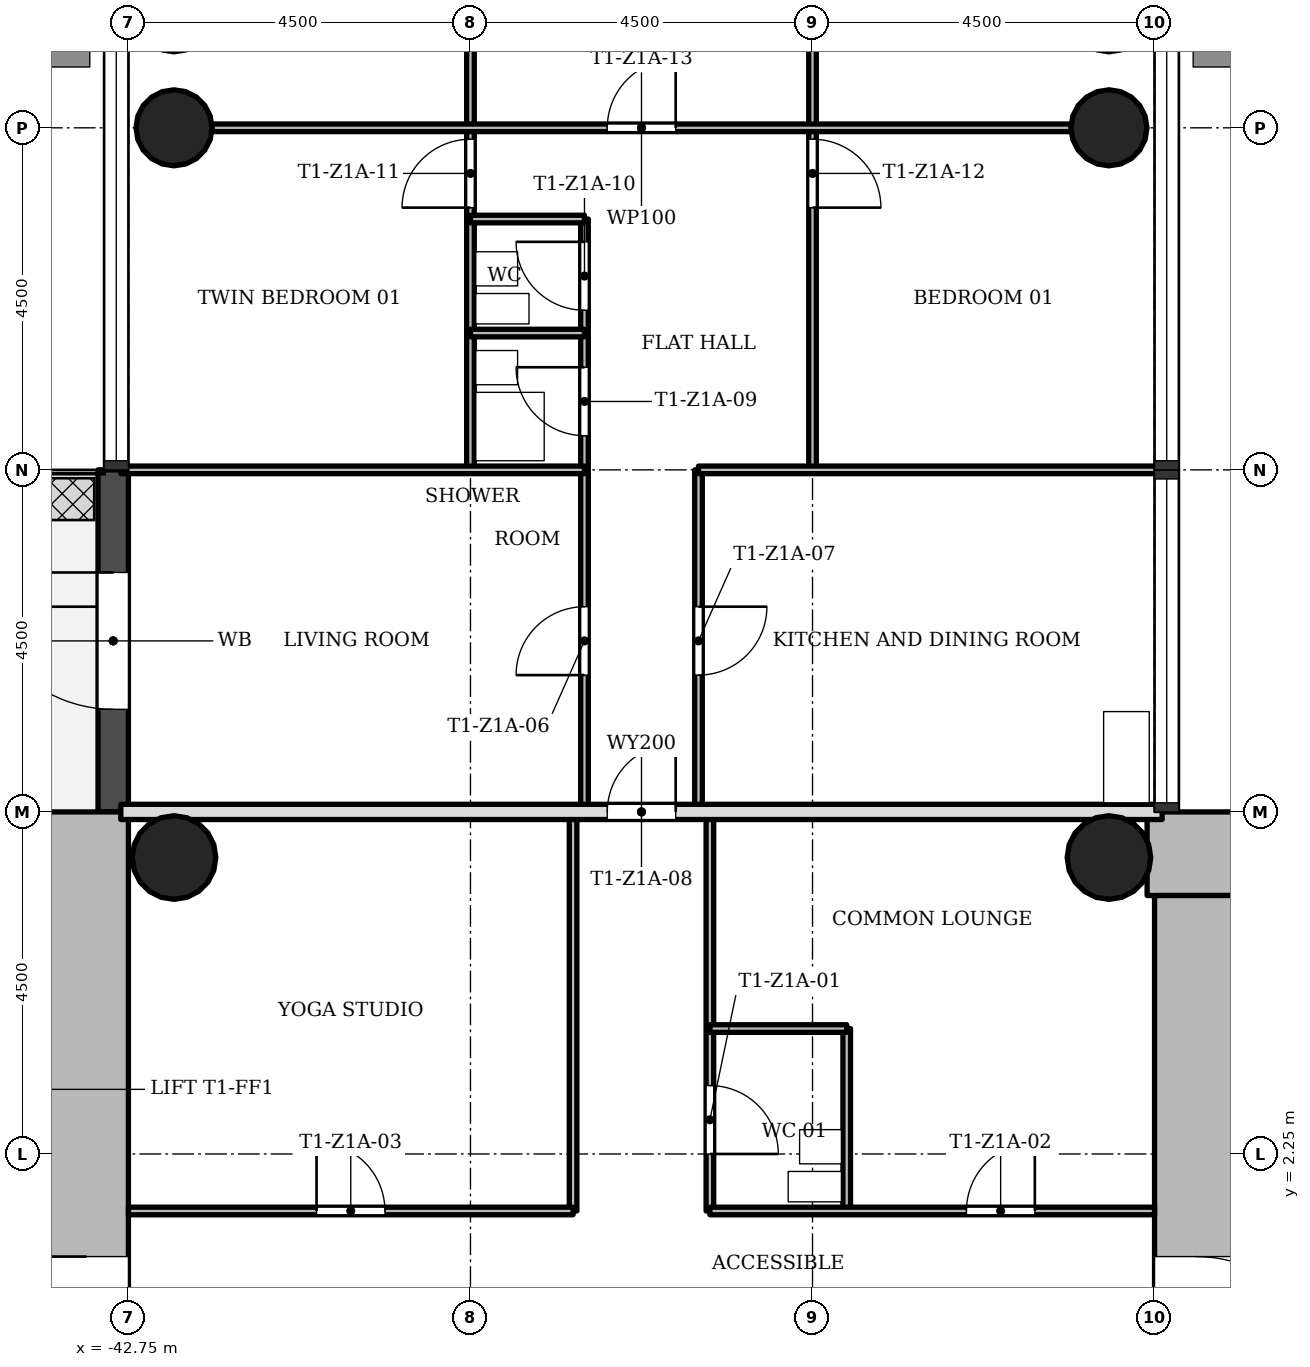
"""IFC4 building model, lengths in metres.
Left out: names, types, materials, properties, quantities, classifications, styles, units other than length and angle.
Written with IfcOpenShell. Run it as: python <this file> out.ifc"""

import sys

from ifc_helpers import new_model, si_unit, direction, frame, frame_2d, origin, origin_2d, place, context, subcontext, project, spatial, rectangle, hollow_circle, extrude, element, fill, save


model = new_model("IFC4")
c1 = context("Model", 3, precision=1e-05, world=origin(), true_north=direction((0.0, 1.0)))
c2 = subcontext(c1, "Body", "Model", "MODEL_VIEW")
j1 = project(units=[si_unit("LENGTHUNIT", "METRE"), si_unit("PLANEANGLEUNIT", "RADIAN")], contexts=[c1])
p1 = place(None, origin())
s1 = spatial("IfcSite", under=j1, at=p1, CompositionType="ELEMENT")
p2 = place(p1, origin())
s2 = spatial("IfcBuilding", under=s1, at=p2, CompositionType="ELEMENT")
p3 = place(p2, frame((0.0, 0.0, 31.3)))
s3 = spatial("IfcBuildingStorey", under=s2, at=p3, CompositionType="ELEMENT", Elevation=31.3)
p4 = place(p3, frame((-21.35, 6.2, 0.0), z_axis=(0.0, 0.0, 1.0), x_axis=(-1.0, 0.0, 0.0)))
e1 = element("IfcWall", 1, at=p4, inside=s3, PredefinedType="SHEAR", context=c2, shape_type="SweptSolid", body=[
    extrude(rectangle(XDim=7.998, YDim=1.1, at=frame_2d((3.999, 0.0))), origin(), (0.0, 0.0, 1.0), 3.4),
])
p5 = place(p3, frame((-28.7, 5.65, 0.0), z_axis=(0.0, 0.0, 1.0), x_axis=(0.0, -1.0, 0.0)))
e2 = element("IfcWall", 2, at=p5, inside=s3, PredefinedType="SHEAR", context=c2, shape_type="SweptSolid", body=[
    extrude(rectangle(XDim=12.4, YDim=1.1, at=frame_2d((6.2, 0.0))), origin(), (0.0, 0.0, 1.0), 3.4),
])
p6 = place(p5, frame((4.75, 0.0, 0.0)))
e3 = element("IfcOpeningElement", 3, at=p6, cuts=e2, PredefinedType="OPENING", context=c2, shape_type="SweptSolid", body=[
    extrude(rectangle(XDim=1.8, YDim=2.1, at=frame_2d((0.9, 1.05))), frame((0.0, 0.56, 0.0), z_axis=(0.0, -1.0, 0.0), x_axis=(1.0, 0.0, 0.0)), (0.0, 0.0, 1.0), 1.12),
])
p7 = place(p3, frame((-43.3, -5.65, 0.0), z_axis=(0.0, 0.0, 1.0), x_axis=(0.0, 1.0, 0.0)))
e4 = element("IfcWall", 4, at=p7, inside=s3, PredefinedType="SHEAR", context=c2, shape_type="SweptSolid", body=[
    extrude(rectangle(XDim=12.4, YDim=1.1, at=frame_2d((6.2, 0.0))), origin(), (0.0, 0.0, 1.0), 3.4),
])
p8 = place(p7, frame((4.75, 0.0, 0.0)))
e5 = element("IfcOpeningElement", 5, at=p8, cuts=e4, PredefinedType="OPENING", context=c2, shape_type="SweptSolid", body=[
    extrude(rectangle(XDim=1.8, YDim=2.1, at=frame_2d((0.9, 1.05))), frame((0.0, 0.56, 0.0), z_axis=(0.0, -1.0, 0.0), x_axis=(1.0, 0.0, 0.0)), (0.0, 0.0, 1.0), 1.12),
])
for number, where, z_axis, x_axis in (
    (6, (-29.85, 15.75, 0.0), (0.0, 0.0, 1.0), (1.0, 0.0, 0.0)),
    (7, (-42.15, 15.75, 0.0), (0.0, 0.0, 1.0), (1.0, 0.0, 0.0)),
):
    element("IfcColumn", number, at=place(p3, frame(where, z_axis=z_axis, x_axis=x_axis)), inside=s3, PredefinedType="COLUMN", context=c2, shape_type="SweptSolid", body=[
        extrude(hollow_circle(Radius=0.5, WallThickness=0.036, at=origin_2d()), origin(), (0.0, 0.0, 1.0), 3.4),
    ])
for number, where, z_axis, x_axis in (
    (8, (-29.85, 6.15, 0.0), (0.0, 0.0, 1.0), (1.0, 0.0, 0.0)),
    (9, (-42.15, 6.15, 0.0), (0.0, 0.0, 1.0), (1.0, 0.0, 0.0)),
):
    element("IfcColumn", number, at=place(p3, frame(where, z_axis=z_axis, x_axis=x_axis)), inside=s3, PredefinedType="COLUMN", context=c2, shape_type="SweptSolid", body=[
        extrude(hollow_circle(Radius=0.55, WallThickness=0.04, at=origin_2d()), origin(), (0.0, 0.0, 1.0), 3.4),
    ])
p9 = place(p3, frame((-42.95, 11.25, -0.02), z_axis=(0.0, 0.0, 1.0), x_axis=(0.0, -1.0, 0.0)))
e10 = element("IfcWall", 10, at=p9, inside=s3, PredefinedType="STANDARD", context=c2, shape_type="SweptSolid", body=[
    extrude(rectangle(XDim=4.5, YDim=0.4, at=frame_2d((2.25, 0.0))), origin(), (0.0, 0.0, 1.0), 3.12),
])
p10 = place(p9, frame((1.35, 0.0, 0.02)))
e11 = element("IfcOpeningElement", 11, at=p10, cuts=e10, PredefinedType="OPENING", context=c2, shape_type="SweptSolid", body=[
    extrude(rectangle(XDim=1.8, YDim=2.1, at=frame_2d((0.9, 1.05))), frame((0.0, 0.21, 0.0), z_axis=(0.0, -1.0, 0.0), x_axis=(1.0, 0.0, 0.0)), (0.0, 0.0, 1.0), 0.42),
])
p11 = place(p3, frame((-38.25, 11.25, 0.0), z_axis=(0.0, 0.0, 1.0), x_axis=(0.0, 1.0, 0.0)))
e12 = element("IfcWall", 12, at=p11, inside=s3, PredefinedType="PARTITIONING", context=c2, shape_type="SweptSolid", body=[
    extrude(rectangle(XDim=9.1, YDim=0.1, at=frame_2d((4.55, 0.0))), origin(), (0.0, 0.0, 1.0), 3.0),
])
p12 = place(p11, frame((3.45, 0.0, 0.0)))
e13 = element("IfcOpeningElement", 13, at=p12, cuts=e12, PredefinedType="OPENING", context=c2, shape_type="SweptSolid", body=[
    extrude(rectangle(XDim=0.9, YDim=2.1, at=frame_2d((0.45, 1.05))), frame((0.0, 0.06, 0.0), z_axis=(0.0, -1.0, 0.0), x_axis=(1.0, 0.0, 0.0)), (0.0, 0.0, 1.0), 0.12),
])
p13 = place(p11, frame((5.55, 0.0, 0.0)))
e14 = element("IfcOpeningElement", 14, at=p13, cuts=e12, PredefinedType="OPENING", context=c2, shape_type="SweptSolid", body=[
    extrude(rectangle(XDim=0.9, YDim=2.1, at=frame_2d((0.45, 1.05))), frame((0.0, 0.06, 0.0), z_axis=(0.0, -1.0, 0.0), x_axis=(1.0, 0.0, 0.0)), (0.0, 0.0, 1.0), 0.12),
])
p14 = place(p3, frame((-36.9, 1.5, 0.0), z_axis=(0.0, 0.0, 1.0), x_axis=(0.0, 1.0, 0.0)))
e15 = element("IfcWall", 15, at=p14, inside=s3, PredefinedType="PARTITIONING", context=c2, shape_type="SweptSolid", body=[
    extrude(rectangle(XDim=5.25, YDim=0.1, at=frame_2d((2.625, 0.0))), origin(), (0.0, 0.0, 1.0), 3.0),
])
p15 = place(p3, frame((-36.75, 6.75, 0.0), z_axis=(0.0, 0.0, 1.0), x_axis=(0.0, 1.0, 0.0)))
e16 = element("IfcWall", 16, at=p15, inside=s3, PredefinedType="PARTITIONING", context=c2, shape_type="SweptSolid", body=[
    extrude(rectangle(XDim=7.8, YDim=0.1, at=frame_2d((3.9, 0.0))), origin(), (0.0, 0.0, 1.0), 3.0),
])
p16 = place(p15, frame((1.8, 0.0, 0.0)))
e17 = element("IfcOpeningElement", 17, at=p16, cuts=e16, PredefinedType="OPENING", context=c2, shape_type="SweptSolid", body=[
    extrude(rectangle(XDim=0.9, YDim=2.1, at=frame_2d((0.45, 1.05))), frame((0.0, 0.06, 0.0), z_axis=(0.0, -1.0, 0.0), x_axis=(1.0, 0.0, 0.0)), (0.0, 0.0, 1.0), 0.12),
])
p17 = place(p15, frame((4.95, 0.0, 0.0)))
e18 = element("IfcOpeningElement", 18, at=p17, cuts=e16, PredefinedType="OPENING", context=c2, shape_type="SweptSolid", body=[
    extrude(rectangle(XDim=0.9, YDim=2.1, at=frame_2d((0.45, 1.05))), frame((0.0, 0.06, 0.0), z_axis=(0.0, -1.0, 0.0), x_axis=(1.0, 0.0, 0.0)), (0.0, 0.0, 1.0), 0.12),
])
p18 = place(p15, frame((6.6, 0.0, 0.0)))
e19 = element("IfcOpeningElement", 19, at=p18, cuts=e16, PredefinedType="OPENING", context=c2, shape_type="SweptSolid", body=[
    extrude(rectangle(XDim=0.9, YDim=2.1, at=frame_2d((0.45, 1.05))), frame((0.0, 0.06, 0.0), z_axis=(0.0, -1.0, 0.0), x_axis=(1.0, 0.0, 0.0)), (0.0, 0.0, 1.0), 0.12),
])
p19 = place(p3, frame((-35.25, 6.75, 0.0), z_axis=(0.0, 0.0, 1.0), x_axis=(0.0, 1.0, 0.0)))
e20 = element("IfcWall", 20, at=p19, inside=s3, PredefinedType="PARTITIONING", context=c2, shape_type="SweptSolid", body=[
    extrude(rectangle(XDim=4.5, YDim=0.1, at=frame_2d((2.25, 0.0))), origin(), (0.0, 0.0, 1.0), 3.0),
])
p20 = place(p19, frame((1.8, 0.0, 0.0)))
e21 = element("IfcOpeningElement", 21, at=p20, cuts=e20, PredefinedType="OPENING", context=c2, shape_type="SweptSolid", body=[
    extrude(rectangle(XDim=0.9, YDim=2.1, at=frame_2d((0.45, 1.05))), frame((0.0, 0.06, 0.0), z_axis=(0.0, -1.0, 0.0), x_axis=(1.0, 0.0, 0.0)), (0.0, 0.0, 1.0), 0.12),
])
p21 = place(p3, frame((-35.1, 1.5, 0.0), z_axis=(0.0, 0.0, 1.0), x_axis=(0.0, 1.0, 0.0)))
e22 = element("IfcWall", 22, at=p21, inside=s3, PredefinedType="PARTITIONING", context=c2, shape_type="SweptSolid", body=[
    extrude(rectangle(XDim=5.25, YDim=0.1, at=frame_2d((2.625, 0.0))), origin(), (0.0, 0.0, 1.0), 3.0),
])
p22 = place(p21, frame((0.75, 0.0, 0.0)))
e23 = element("IfcOpeningElement", 23, at=p22, cuts=e22, PredefinedType="OPENING", context=c2, shape_type="SweptSolid", body=[
    extrude(rectangle(XDim=0.9, YDim=2.1, at=frame_2d((0.45, 1.05))), frame((0.0, 0.06, 0.0), z_axis=(0.0, -1.0, 0.0), x_axis=(1.0, 0.0, 0.0)), (0.0, 0.0, 1.0), 0.12),
])
p23 = place(p3, frame((-33.75, 11.25, 0.0), z_axis=(0.0, 0.0, 1.0), x_axis=(0.0, 1.0, 0.0)))
e24 = element("IfcWall", 24, at=p23, inside=s3, PredefinedType="PARTITIONING", context=c2, shape_type="SweptSolid", body=[
    extrude(rectangle(XDim=9.1, YDim=0.1, at=frame_2d((4.55, 0.0))), origin(), (0.0, 0.0, 1.0), 3.0),
])
p24 = place(p23, frame((3.45, 0.0, 0.0)))
e25 = element("IfcOpeningElement", 25, at=p24, cuts=e24, PredefinedType="OPENING", context=c2, shape_type="SweptSolid", body=[
    extrude(rectangle(XDim=0.9, YDim=2.1, at=frame_2d((0.45, 1.05))), frame((0.0, 0.06, 0.0), z_axis=(0.0, -1.0, 0.0), x_axis=(1.0, 0.0, 0.0)), (0.0, 0.0, 1.0), 0.12),
])
p25 = place(p23, frame((5.55, 0.0, 0.0)))
e26 = element("IfcOpeningElement", 26, at=p25, cuts=e24, PredefinedType="OPENING", context=c2, shape_type="SweptSolid", body=[
    extrude(rectangle(XDim=0.9, YDim=2.1, at=frame_2d((0.45, 1.05))), frame((0.0, 0.06, 0.0), z_axis=(0.0, -1.0, 0.0), x_axis=(1.0, 0.0, 0.0)), (0.0, 0.0, 1.0), 0.12),
])
p26 = place(p3, frame((-33.3, 1.5, 0.0), z_axis=(0.0, 0.0, 1.0), x_axis=(0.0, 1.0, 0.0)))
e27 = element("IfcWall", 27, at=p26, inside=s3, PredefinedType="PARTITIONING", context=c2, shape_type="SweptSolid", body=[
    extrude(rectangle(XDim=2.4, YDim=0.1, at=frame_2d((1.2, 0.0))), origin(), (0.0, 0.0, 1.0), 3.0),
])
p27 = place(p3, frame((-42.75, 1.5, 0.0), z_axis=(0.0, 0.0, 1.0), x_axis=(1.0, 0.0, 0.0)))
e28 = element("IfcWall", 28, at=p27, inside=s3, PredefinedType="PARTITIONING", context=c2, shape_type="SweptSolid", body=[
    extrude(rectangle(XDim=5.85, YDim=0.1, at=frame_2d((2.925, 0.0))), origin(), (0.0, 0.0, 1.0), 3.0),
])
p28 = place(p27, frame((2.475, 0.0, 0.0)))
e29 = element("IfcOpeningElement", 29, at=p28, cuts=e28, PredefinedType="OPENING", context=c2, shape_type="SweptSolid", body=[
    extrude(rectangle(XDim=0.9, YDim=2.1, at=frame_2d((0.45, 1.05))), frame((0.0, 0.06, 0.0), z_axis=(0.0, -1.0, 0.0), x_axis=(1.0, 0.0, 0.0)), (0.0, 0.0, 1.0), 0.12),
])
p29 = place(p3, frame((-35.1, 1.5, 0.0), z_axis=(0.0, 0.0, 1.0), x_axis=(1.0, 0.0, 0.0)))
e30 = element("IfcWall", 30, at=p29, inside=s3, PredefinedType="PARTITIONING", context=c2, shape_type="SweptSolid", body=[
    extrude(rectangle(XDim=5.85, YDim=0.1, at=frame_2d((2.925, 0.0))), origin(), (0.0, 0.0, 1.0), 3.0),
])
p30 = place(p29, frame((3.375, 0.0, 0.0)))
e31 = element("IfcOpeningElement", 31, at=p30, cuts=e30, PredefinedType="OPENING", context=c2, shape_type="SweptSolid", body=[
    extrude(rectangle(XDim=0.9, YDim=2.1, at=frame_2d((0.45, 1.05))), frame((0.0, 0.06, 0.0), z_axis=(0.0, -1.0, 0.0), x_axis=(1.0, 0.0, 0.0)), (0.0, 0.0, 1.0), 0.12),
])
p31 = place(p3, frame((-35.1, 3.9, 0.0), z_axis=(0.0, 0.0, 1.0), x_axis=(1.0, 0.0, 0.0)))
e32 = element("IfcWall", 32, at=p31, inside=s3, PredefinedType="PARTITIONING", context=c2, shape_type="SweptSolid", body=[
    extrude(rectangle(XDim=1.8, YDim=0.1, at=frame_2d((0.9, 0.0))), origin(), (0.0, 0.0, 1.0), 3.0),
])
p32 = place(p3, frame((-42.85, 6.75, 0.0), z_axis=(0.0, 0.0, 1.0), x_axis=(1.0, 0.0, 0.0)))
e33 = element("IfcWall", 33, at=p32, inside=s3, PredefinedType="SOLIDWALL", context=c2, shape_type="SweptSolid", body=[
    extrude(rectangle(XDim=13.7, YDim=0.2, at=frame_2d((6.85, 0.0))), origin(), (0.0, 0.0, 1.0), 3.0),
])
p33 = place(p32, frame((6.4, 0.0, 0.0)))
e34 = element("IfcOpeningElement", 34, at=p33, cuts=e33, PredefinedType="OPENING", context=c2, shape_type="SweptSolid", body=[
    extrude(rectangle(XDim=0.9, YDim=2.1, at=frame_2d((0.45, 1.05))), frame((0.0, 0.11, 0.0), z_axis=(0.0, -1.0, 0.0), x_axis=(1.0, 0.0, 0.0)), (0.0, 0.0, 1.0), 0.22),
])
for number, where, z_axis, x_axis in (
    (35, (-42.85, 11.25, 0.0), (0.0, 0.0, 1.0), (1.0, 0.0, 0.0)),
    (36, (-35.25, 11.25, 0.0), (0.0, 0.0, 1.0), (1.0, 0.0, 0.0)),
):
    element("IfcWall", number, at=place(p3, frame(where, z_axis=z_axis, x_axis=x_axis)), inside=s3, PredefinedType="PARTITIONING", context=c2, shape_type="SweptSolid", body=[
        extrude(rectangle(XDim=6.1, YDim=0.1, at=frame_2d((3.05, 0.0))), origin(), (0.0, 0.0, 1.0), 3.0),
    ])
for number, where, z_axis, x_axis in (
    (37, (-38.25, 13.05, 0.0), (0.0, 0.0, 1.0), (1.0, 0.0, 0.0)),
    (38, (-38.25, 14.55, 0.0), (0.0, 0.0, 1.0), (1.0, 0.0, 0.0)),
):
    element("IfcWall", number, at=place(p3, frame(where, z_axis=z_axis, x_axis=x_axis)), inside=s3, PredefinedType="PARTITIONING", context=c2, shape_type="SweptSolid", body=[
        extrude(rectangle(XDim=1.5, YDim=0.1, at=frame_2d((0.75, 0.0))), origin(), (0.0, 0.0, 1.0), 3.0),
    ])
p34 = place(p3, frame((-41.65, 15.75, 0.0), z_axis=(0.0, 0.0, 1.0), x_axis=(1.0, 0.0, 0.0)))
e39 = element("IfcWall", 39, at=p34, inside=s3, PredefinedType="PARTITIONING", context=c2, shape_type="SweptSolid", body=[
    extrude(rectangle(XDim=11.3, YDim=0.1, at=frame_2d((5.65, 0.0))), origin(), (0.0, 0.0, 1.0), 3.0),
])
p35 = place(p34, frame((5.2, 0.0, 0.0)))
e40 = element("IfcOpeningElement", 40, at=p35, cuts=e39, PredefinedType="OPENING", context=c2, shape_type="SweptSolid", body=[
    extrude(rectangle(XDim=0.9, YDim=2.1, at=frame_2d((0.45, 1.05))), frame((0.0, 0.06, 0.0), z_axis=(0.0, -1.0, 0.0), x_axis=(1.0, 0.0, 0.0)), (0.0, 0.0, 1.0), 0.12),
])
p36 = place(p10, origin())
e41 = element("IfcDoor", 41, at=p36, inside=s3, OperationType="SINGLE_SWING_LEFT", PredefinedType="DOOR", context=c2, shape_type="SweptSolid", body=[
    extrude(rectangle(XDim=1.8, YDim=2.1, at=frame_2d((0.9, 1.05))), frame((0.0, 0.025, 0.0), z_axis=(0.0, -1.0, 0.0), x_axis=(1.0, 0.0, 0.0)), (0.0, 0.0, 1.0), 0.05),
])
fill(e11, e41)
p37 = place(p22, origin())
e42 = element("IfcDoor", 42, at=p37, inside=s3, OperationType="SINGLE_SWING_LEFT", PredefinedType="DOOR", context=c2, shape_type="SweptSolid", body=[
    extrude(rectangle(XDim=0.9, YDim=2.1, at=frame_2d((0.45, 1.05))), frame((0.0, 0.025, 0.0), z_axis=(0.0, -1.0, 0.0), x_axis=(1.0, 0.0, 0.0)), (0.0, 0.0, 1.0), 0.05),
])
fill(e23, e42)
p38 = place(p30, origin())
e43 = element("IfcDoor", 43, at=p38, inside=s3, OperationType="SINGLE_SWING_LEFT", PredefinedType="DOOR", context=c2, shape_type="SweptSolid", body=[
    extrude(rectangle(XDim=0.9, YDim=2.1, at=frame_2d((0.45, 1.05))), frame((0.0, 0.025, 0.0), z_axis=(0.0, -1.0, 0.0), x_axis=(1.0, 0.0, 0.0)), (0.0, 0.0, 1.0), 0.05),
])
fill(e31, e43)
p39 = place(p28, origin())
e44 = element("IfcDoor", 44, at=p39, inside=s3, OperationType="SINGLE_SWING_RIGHT", PredefinedType="DOOR", context=c2, shape_type="SweptSolid", body=[
    extrude(rectangle(XDim=0.9, YDim=2.1, at=frame_2d((0.45, 1.05))), frame((0.0, 0.025, 0.0), z_axis=(0.0, -1.0, 0.0), x_axis=(1.0, 0.0, 0.0)), (0.0, 0.0, 1.0), 0.05),
])
fill(e29, e44)
p40 = place(p16, origin())
e45 = element("IfcDoor", 45, at=p40, inside=s3, OperationType="SINGLE_SWING_RIGHT", PredefinedType="DOOR", context=c2, shape_type="SweptSolid", body=[
    extrude(rectangle(XDim=0.9, YDim=2.1, at=frame_2d((0.45, 1.05))), frame((0.0, 0.025, 0.0), z_axis=(0.0, -1.0, 0.0), x_axis=(1.0, 0.0, 0.0)), (0.0, 0.0, 1.0), 0.05),
])
fill(e17, e45)
p41 = place(p20, origin())
e46 = element("IfcDoor", 46, at=p41, inside=s3, OperationType="SINGLE_SWING_RIGHT", PredefinedType="DOOR", context=c2, shape_type="SweptSolid", body=[
    extrude(rectangle(XDim=0.9, YDim=2.1, at=frame_2d((0.45, 1.05))), frame((0.0, 0.025, 0.0), z_axis=(0.0, -1.0, 0.0), x_axis=(1.0, 0.0, 0.0)), (0.0, 0.0, 1.0), 0.05),
])
fill(e21, e46)
p42 = place(p33, origin())
e47 = element("IfcDoor", 47, at=p42, inside=s3, OperationType="SINGLE_SWING_LEFT", PredefinedType="DOOR", context=c2, shape_type="SweptSolid", body=[
    extrude(rectangle(XDim=0.9, YDim=2.1, at=frame_2d((0.45, 1.05))), frame((0.0, 0.025, 0.0), z_axis=(0.0, -1.0, 0.0), x_axis=(1.0, 0.0, 0.0)), (0.0, 0.0, 1.0), 0.05),
])
fill(e34, e47)
p43 = place(p17, origin())
e48 = element("IfcDoor", 48, at=p43, inside=s3, OperationType="SINGLE_SWING_LEFT", PredefinedType="DOOR", context=c2, shape_type="SweptSolid", body=[
    extrude(rectangle(XDim=0.9, YDim=2.1, at=frame_2d((0.45, 1.05))), frame((0.0, 0.025, 0.0), z_axis=(0.0, -1.0, 0.0), x_axis=(1.0, 0.0, 0.0)), (0.0, 0.0, 1.0), 0.05),
])
fill(e18, e48)
p44 = place(p18, origin())
e49 = element("IfcDoor", 49, at=p44, inside=s3, OperationType="SINGLE_SWING_LEFT", PredefinedType="DOOR", context=c2, shape_type="SweptSolid", body=[
    extrude(rectangle(XDim=0.9, YDim=2.1, at=frame_2d((0.45, 1.05))), frame((0.0, 0.025, 0.0), z_axis=(0.0, -1.0, 0.0), x_axis=(1.0, 0.0, 0.0)), (0.0, 0.0, 1.0), 0.05),
])
fill(e19, e49)
p45 = place(p12, origin())
e50 = element("IfcDoor", 50, at=p45, inside=s3, OperationType="SINGLE_SWING_RIGHT", PredefinedType="DOOR", context=c2, shape_type="SweptSolid", body=[
    extrude(rectangle(XDim=0.9, YDim=2.1, at=frame_2d((0.45, 1.05))), frame((0.0, 0.025, 0.0), z_axis=(0.0, -1.0, 0.0), x_axis=(1.0, 0.0, 0.0)), (0.0, 0.0, 1.0), 0.05),
])
fill(e13, e50)
p46 = place(p24, origin())
e51 = element("IfcDoor", 51, at=p46, inside=s3, OperationType="SINGLE_SWING_LEFT", PredefinedType="DOOR", context=c2, shape_type="SweptSolid", body=[
    extrude(rectangle(XDim=0.9, YDim=2.1, at=frame_2d((0.45, 1.05))), frame((0.0, 0.025, 0.0), z_axis=(0.0, -1.0, 0.0), x_axis=(1.0, 0.0, 0.0)), (0.0, 0.0, 1.0), 0.05),
])
fill(e25, e51)
p47 = place(p35, origin())
e52 = element("IfcDoor", 52, at=p47, inside=s3, OperationType="SINGLE_SWING_LEFT", PredefinedType="DOOR", context=c2, shape_type="SweptSolid", body=[
    extrude(rectangle(XDim=0.9, YDim=2.1, at=frame_2d((0.45, 1.05))), frame((0.0, 0.025, 0.0), z_axis=(0.0, -1.0, 0.0), x_axis=(1.0, 0.0, 0.0)), (0.0, 0.0, 1.0), 0.05),
])
fill(e40, e52)
p48 = place(p6, origin())
e53 = element("IfcDoor", 53, at=p48, inside=s3, OperationType="SINGLE_SWING_LEFT", PredefinedType="DOOR", context=c2, shape_type="SweptSolid", body=[
    extrude(rectangle(XDim=1.8, YDim=2.1, at=frame_2d((0.9, 1.05))), frame((0.0, 0.025, 0.0), z_axis=(0.0, -1.0, 0.0), x_axis=(1.0, 0.0, 0.0)), (0.0, 0.0, 1.0), 0.05),
])
fill(e3, e53)
p49 = place(p8, origin())
e54 = element("IfcDoor", 54, at=p49, inside=s3, OperationType="SINGLE_SWING_LEFT", PredefinedType="DOOR", context=c2, shape_type="SweptSolid", body=[
    extrude(rectangle(XDim=1.8, YDim=2.1, at=frame_2d((0.9, 1.05))), frame((0.0, 0.025, 0.0), z_axis=(0.0, -1.0, 0.0), x_axis=(1.0, 0.0, 0.0)), (0.0, 0.0, 1.0), 0.05),
])
fill(e5, e54)
save(model, sys.argv[1])
